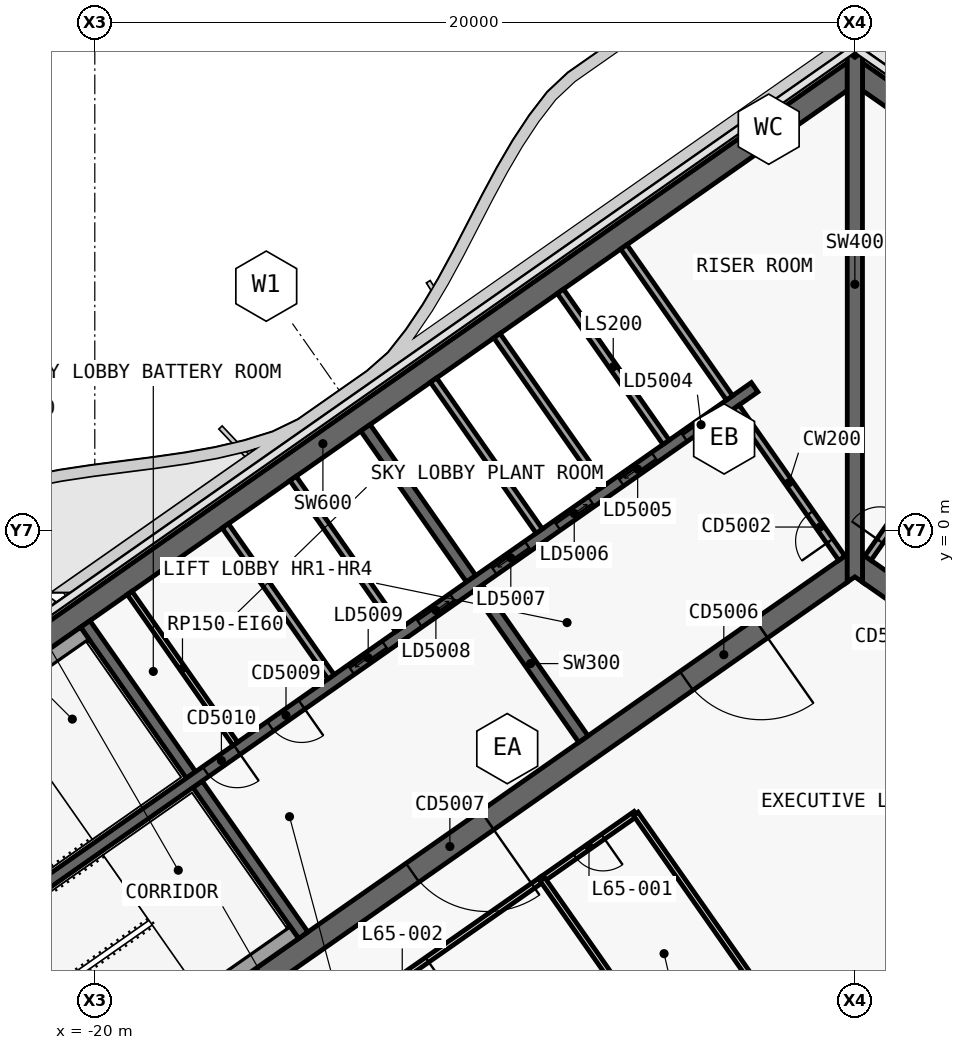
"""IFC4 building model, lengths in metres.
Left out: names, types, materials, properties, quantities, classifications, styles, units other than length and angle.
Written with IfcOpenShell. Run it as: python <this file> out.ifc"""

import sys

from ifc_helpers import new_model, si_unit, direction, frame, frame_2d, origin, place, context, subcontext, project, spatial, polyline, rectangle, outline, extrude, element, fill, save


model = new_model("IFC4")
c1 = context("Model", 3, precision=1e-05, world=origin(), true_north=direction((0.0, 1.0)))
c2 = subcontext(c1, "Body", "Model", "MODEL_VIEW")
j1 = project(units=[si_unit("LENGTHUNIT", "METRE"), si_unit("PLANEANGLEUNIT", "RADIAN")], contexts=[c1])
p1 = place(None, origin())
s1 = spatial("IfcSite", under=j1, at=p1, CompositionType="ELEMENT")
p2 = place(p1, origin())
s2 = spatial("IfcBuilding", under=s1, at=p2, CompositionType="ELEMENT")
p3 = place(p2, frame((0.0, 0.0, 276.1)))
s3 = spatial("IfcBuildingStorey", under=s2, at=p3, CompositionType="ELEMENT", Elevation=276.1)
p4 = place(p3, frame((-0.028, 12.066, 0.0), z_axis=(0.0, 0.0, 1.0), x_axis=(-0.819151382952, -0.573577380837, 0.0)))
e1 = element("IfcWall", 1, at=p4, inside=s3, PredefinedType="SHEAR", context=c2, shape_type="SweptSolid", body=[
    extrude(outline(polyline([(33.898, 0.3), (0.42, 0.3), (0.0, -0.3), (33.898, -0.3), (33.898, 0.3)])), origin(), (0.0, 0.0, 1.0), 3.9),
])
p5 = place(p3, frame((-0.028, -0.874, 0.0), z_axis=(0.0, 0.0, 1.0), x_axis=(-0.819150035022, -0.573579305871, 0.0)))
e2 = element("IfcWall", 2, at=p5, inside=s3, PredefinedType="SHEAR", context=c2, shape_type="SweptSolid", body=[
    extrude(outline(polyline([(26.476, 0.3), (0.42, 0.3), (0.0, -0.3), (26.476, -0.3), (26.476, 0.3)])), origin(), (0.0, 0.0, 1.0), 3.9),
])
p6 = place(p5, frame((2.976, 0.0, 0.0)))
e3 = element("IfcOpeningElement", 3, at=p6, cuts=e2, PredefinedType="OPENING", context=c2, shape_type="SweptSolid", body=[
    extrude(rectangle(XDim=2.4, YDim=2.1, at=frame_2d((1.2, 1.05))), frame((0.0, 0.31, 0.0), z_axis=(0.0, -1.0, 0.0), x_axis=(1.0, 0.0, 0.0)), (0.0, 0.0, 1.0), 0.62),
])
p7 = place(p5, frame((11.776, 0.0, 0.0)))
e4 = element("IfcOpeningElement", 4, at=p7, cuts=e2, PredefinedType="OPENING", context=c2, shape_type="SweptSolid", body=[
    extrude(rectangle(XDim=2.4, YDim=2.1, at=frame_2d((1.2, 1.05))), frame((0.0, 0.31, 0.0), z_axis=(0.0, -1.0, 0.0), x_axis=(1.0, 0.0, 0.0)), (0.0, 0.0, 1.0), 0.62),
])
p8 = place(p3, frame((-7.143, -5.49, 0.0), z_axis=(0.0, 0.0, 1.0), x_axis=(-0.573617744349, 0.819123118565, 0.0)))
e5 = element("IfcWall", 5, at=p8, inside=s3, PredefinedType="SHEAR", context=c2, shape_type="SweptSolid", body=[
    extrude(outline(polyline([(4.85, 0.15), (0.0, 0.15), (0.0, -0.15), (4.85, -0.15), (4.85, 0.15)])), origin(), (0.0, 0.0, 1.0), 3.9),
])
p9 = place(p3, frame((-10.097, -1.271, 0.0), z_axis=(0.0, 0.0, 1.0), x_axis=(-0.573560315113, 0.819163332265, 0.0)))
e6 = element("IfcWall", 6, at=p9, inside=s3, PredefinedType="SHEAR", context=c2, shape_type="SweptSolid", body=[
    extrude(outline(polyline([(4.85, -0.15), (4.85, 0.15), (0.0, 0.15), (0.0, -0.15), (4.85, -0.15)])), origin(), (0.0, 0.0, 1.0), 3.9),
])
p10 = place(p3, frame((-14.515, -10.652, 0.0), z_axis=(0.0, 0.0, 1.0), x_axis=(-0.573560315113, 0.819163332265, 0.0)))
e7 = element("IfcWall", 7, at=p10, inside=s3, PredefinedType="SHEAR", context=c2, shape_type="SweptSolid", body=[
    extrude(outline(polyline([(4.85, 0.15), (0.0, 0.15), (0.0, -0.15), (4.85, -0.15), (4.85, 0.15)])), origin(), (0.0, 0.0, 1.0), 3.9),
])
p11 = place(p3, frame((-17.469, -6.433, 0.0), z_axis=(0.0, 0.0, 1.0), x_axis=(-0.573594092424, 0.81913968109, 0.0)))
e8 = element("IfcWall", 8, at=p11, inside=s3, PredefinedType="SHEAR", context=c2, shape_type="SweptSolid", body=[
    extrude(outline(polyline([(4.85, -0.15), (4.85, 0.15), (0.0, 0.15), (0.0, -0.15), (4.85, -0.15)])), origin(), (0.0, 0.0, 1.0), 3.9),
])
p12 = place(p3, frame((-2.638, 3.768, 0.0), z_axis=(0.0, 0.0, 1.0), x_axis=(-0.819155014212, -0.573572194837, 0.0)))
e9 = element("IfcWall", 9, at=p12, inside=s3, PredefinedType="SHEAR", context=c2, shape_type="SweptSolid", body=[
    extrude(outline(polyline([(26.4, 0.15), (0.0, 0.15), (0.0, -0.15), (26.4, -0.15), (26.4, 0.15)])), origin(), (0.0, 0.0, 1.0), 3.9),
])
p13 = place(p12, frame((1.169, 0.0, 0.0)))
e10 = element("IfcOpeningElement", 10, at=p13, cuts=e9, PredefinedType="OPENING", context=c2, shape_type="SweptSolid", body=[
    extrude(rectangle(XDim=1.1, YDim=2.1, at=frame_2d((0.55, 1.05))), frame((0.0, 0.16, 0.0), z_axis=(0.0, -1.0, 0.0), x_axis=(1.0, 0.0, 0.0)), (0.0, 0.0, 1.0), 0.32),
])
p14 = place(p12, frame((3.206, 0.0, 0.0)))
e11 = element("IfcOpeningElement", 11, at=p14, cuts=e9, PredefinedType="OPENING", context=c2, shape_type="SweptSolid", body=[
    extrude(rectangle(XDim=1.1, YDim=2.1, at=frame_2d((0.55, 1.05))), frame((0.0, 0.16, 0.0), z_axis=(0.0, -1.0, 0.0), x_axis=(1.0, 0.0, 0.0)), (0.0, 0.0, 1.0), 0.32),
])
p15 = place(p12, frame((5.244, 0.0, 0.0)))
e12 = element("IfcOpeningElement", 12, at=p15, cuts=e9, PredefinedType="OPENING", context=c2, shape_type="SweptSolid", body=[
    extrude(rectangle(XDim=1.1, YDim=2.1, at=frame_2d((0.55, 1.05))), frame((0.0, 0.16, 0.0), z_axis=(0.0, -1.0, 0.0), x_axis=(1.0, 0.0, 0.0)), (0.0, 0.0, 1.0), 0.32),
])
p16 = place(p12, frame((7.281, 0.0, 0.0)))
e13 = element("IfcOpeningElement", 13, at=p16, cuts=e9, PredefinedType="OPENING", context=c2, shape_type="SweptSolid", body=[
    extrude(rectangle(XDim=1.1, YDim=2.1, at=frame_2d((0.55, 1.05))), frame((0.0, 0.16, 0.0), z_axis=(0.0, -1.0, 0.0), x_axis=(1.0, 0.0, 0.0)), (0.0, 0.0, 1.0), 0.32),
])
p17 = place(p12, frame((9.688, 0.0, 0.0)))
e14 = element("IfcOpeningElement", 14, at=p17, cuts=e9, PredefinedType="OPENING", context=c2, shape_type="SweptSolid", body=[
    extrude(rectangle(XDim=1.1, YDim=2.1, at=frame_2d((0.55, 1.05))), frame((0.0, 0.16, 0.0), z_axis=(0.0, -1.0, 0.0), x_axis=(1.0, 0.0, 0.0)), (0.0, 0.0, 1.0), 0.32),
])
p18 = place(p12, frame((11.863, 0.0, 0.0)))
e15 = element("IfcOpeningElement", 15, at=p18, cuts=e9, PredefinedType="OPENING", context=c2, shape_type="SweptSolid", body=[
    extrude(rectangle(XDim=1.1, YDim=2.1, at=frame_2d((0.55, 1.05))), frame((0.0, 0.16, 0.0), z_axis=(0.0, -1.0, 0.0), x_axis=(1.0, 0.0, 0.0)), (0.0, 0.0, 1.0), 0.32),
])
p19 = place(p12, frame((14.552, 0.0, 0.0)))
e16 = element("IfcOpeningElement", 16, at=p19, cuts=e9, PredefinedType="OPENING", context=c2, shape_type="SweptSolid", body=[
    extrude(rectangle(XDim=1.0, YDim=2.1, at=frame_2d((0.5, 1.05))), frame((0.0, 0.16, 0.0), z_axis=(0.0, -1.0, 0.0), x_axis=(1.0, 0.0, 0.0)), (0.0, 0.0, 1.0), 0.32),
])
p20 = place(p12, frame((16.627, 0.0, 0.0)))
e17 = element("IfcOpeningElement", 17, at=p20, cuts=e9, PredefinedType="OPENING", context=c2, shape_type="SweptSolid", body=[
    extrude(rectangle(XDim=1.0, YDim=2.1, at=frame_2d((0.5, 1.05))), frame((0.0, 0.16, 0.0), z_axis=(0.0, -1.0, 0.0), x_axis=(1.0, 0.0, 0.0)), (0.0, 0.0, 1.0), 0.32),
])
p21 = place(p3, frame((0.028, 12.066, 0.0), z_axis=(0.0, 0.0, 1.0), x_axis=(0.819151382952, -0.573577380837, 0.0)))
e18 = element("IfcWall", 18, at=p21, inside=s3, PredefinedType="SHEAR", context=c2, shape_type="SweptSolid", body=[
    extrude(outline(polyline([(33.898, 0.3), (0.0, 0.3), (0.42, -0.3), (33.898, -0.3), (33.898, 0.3)])), origin(), (0.0, 0.0, 1.0), 3.9),
])
p22 = place(p3, frame((0.028, -0.874, 0.0), z_axis=(0.0, 0.0, 1.0), x_axis=(0.819150035022, -0.573579305871, 0.0)))
e19 = element("IfcWall", 19, at=p22, inside=s3, PredefinedType="SHEAR", context=c2, shape_type="SweptSolid", body=[
    extrude(outline(polyline([(26.476, 0.3), (0.0, 0.3), (0.42, -0.3), (26.476, -0.3), (26.476, 0.3)])), origin(), (0.0, 0.0, 1.0), 3.9),
])
p23 = place(p22, frame((6.576, 0.0, 0.0)))
e20 = element("IfcOpeningElement", 20, at=p23, cuts=e19, PredefinedType="OPENING", context=c2, shape_type="SweptSolid", body=[
    extrude(rectangle(XDim=1.5, YDim=2.1, at=frame_2d((0.75, 1.05))), frame((0.0, 0.31, 0.0), z_axis=(0.0, -1.0, 0.0), x_axis=(1.0, 0.0, 0.0)), (0.0, 0.0, 1.0), 0.62),
])
p24 = place(p22, frame((12.226, 0.0, 0.0)))
e21 = element("IfcOpeningElement", 21, at=p24, cuts=e19, PredefinedType="OPENING", context=c2, shape_type="SweptSolid", body=[
    extrude(rectangle(XDim=1.5, YDim=2.1, at=frame_2d((0.75, 1.05))), frame((0.0, 0.31, 0.0), z_axis=(0.0, -1.0, 0.0), x_axis=(1.0, 0.0, 0.0)), (0.0, 0.0, 1.0), 0.62),
])
p25 = place(p3, frame((0.0, -1.361, 0.0), z_axis=(0.0, 0.0, 1.0), x_axis=(0.0, 1.0, 0.0)))
e22 = element("IfcWall", 22, at=p25, inside=s3, PredefinedType="SHEAR", context=c2, shape_type="SweptSolid", body=[
    extrude(outline(polyline([(0.14, 0.2), (0.0, 0.2), (0.14, 0.0), (0.0, -0.2), (0.14, -0.2), (1.012, -0.2), (12.94, -0.2), (13.813, -0.2), (13.893, -0.2), (13.933, -0.172), (13.813, 0.0), (13.933, 0.172), (13.893, 0.2), (13.813, 0.2), (12.94, 0.2), (1.012, 0.2), (0.14, 0.2)])), origin(), (0.0, 0.0, 1.0), 3.9),
])
p26 = place(p3, frame((-4.967, 2.321, 0.0), z_axis=(0.0, 0.0, 1.0), x_axis=(-0.573594092424, 0.81913968109, 0.0)))
e23 = element("IfcWall", 23, at=p26, inside=s3, PredefinedType="SOLIDWALL", context=c2, shape_type="SweptSolid", body=[
    extrude(rectangle(XDim=4.85, YDim=0.2, at=frame_2d((2.425, 0.0))), origin(), (0.0, 0.0, 1.0), 3.9),
])
p27 = place(p3, frame((-6.636, 1.152, 0.0), z_axis=(0.0, 0.0, 1.0), x_axis=(-0.573560315113, 0.819163332265, 0.0)))
e24 = element("IfcWall", 24, at=p27, inside=s3, PredefinedType="SOLIDWALL", context=c2, shape_type="SweptSolid", body=[
    extrude(rectangle(XDim=4.85, YDim=0.2, at=frame_2d((2.425, 0.0))), origin(), (0.0, 0.0, 1.0), 3.9),
])
p28 = place(p3, frame((-8.305, -0.017, 0.0), z_axis=(0.0, 0.0, 1.0), x_axis=(-0.573594092424, 0.81913968109, 0.0)))
e25 = element("IfcWall", 25, at=p28, inside=s3, PredefinedType="SOLIDWALL", context=c2, shape_type="SweptSolid", body=[
    extrude(rectangle(XDim=4.85, YDim=0.2, at=frame_2d((2.425, 0.0))), origin(), (0.0, 0.0, 1.0), 3.9),
])
p29 = place(p3, frame((-16.302, -5.616, 0.0), z_axis=(0.0, 0.0, 1.0), x_axis=(-0.573560315113, 0.819163332265, 0.0)))
e26 = element("IfcWall", 26, at=p29, inside=s3, PredefinedType="PARTITIONING", context=c2, shape_type="SweptSolid", body=[
    extrude(rectangle(XDim=4.85, YDim=0.15, at=frame_2d((2.425, 0.0))), origin(), (0.0, 0.0, 1.0), 3.62),
])
p30 = place(p3, frame((-12.001, -2.605, 0.0), z_axis=(0.0, 0.0, 1.0), x_axis=(-0.573560315113, 0.819163332265, 0.0)))
e27 = element("IfcWall", 27, at=p30, inside=s3, PredefinedType="SOLIDWALL", context=c2, shape_type="SweptSolid", body=[
    extrude(rectangle(XDim=4.85, YDim=0.2, at=frame_2d((2.425, 0.0))), origin(), (0.0, 0.0, 1.0), 3.9),
])
p31 = place(p3, frame((-13.783, -3.852, 0.0), z_axis=(0.0, 0.0, 1.0), x_axis=(-0.573594092424, 0.81913968109, 0.0)))
e28 = element("IfcWall", 28, at=p31, inside=s3, PredefinedType="SOLIDWALL", context=c2, shape_type="SweptSolid", body=[
    extrude(rectangle(XDim=4.85, YDim=0.2, at=frame_2d((2.425, 0.0))), origin(), (0.0, 0.0, 1.0), 3.9),
])
p32 = place(p3, frame((-20.259, -2.71, 0.0), z_axis=(0.0, 0.0, 1.0), x_axis=(-0.81914849389, -0.573581506813, 0.0)))
e29 = element("IfcWall", 29, at=p32, inside=s3, PredefinedType="SOLIDWALL", context=c2, shape_type="SweptSolid", body=[
    extrude(rectangle(XDim=8.25, YDim=0.4, at=frame_2d((4.125, 0.0))), origin(), (0.0, 0.0, 1.0), 3.62),
])
p33 = place(p3, frame((-14.753, -10.574, 0.0), z_axis=(0.0, 0.0, 1.0), x_axis=(-0.819158229677, -0.573567602601, 0.0)))
e30 = element("IfcWall", 30, at=p33, inside=s3, PredefinedType="SOLIDWALL", context=c2, shape_type="SweptSolid", body=[
    extrude(rectangle(XDim=8.25, YDim=0.4, at=frame_2d((4.125, 0.0))), origin(), (0.0, 0.0, 1.0), 3.62),
])
p34 = place(p3, frame((-0.344, -0.729, 0.0), z_axis=(0.0, 0.0, 1.0), x_axis=(-0.573560315113, 0.819163332265, 0.0)))
e31 = element("IfcWall", 31, at=p34, inside=s3, PredefinedType="SOLIDWALL", context=c2, shape_type="SweptSolid", body=[
    extrude(rectangle(XDim=4.85, YDim=0.2, at=frame_2d((2.425, 0.0))), origin(), (0.0, 0.0, 1.0), 3.62),
])
p35 = place(p34, frame((0.55, 0.0, 0.0)))
e32 = element("IfcOpeningElement", 32, at=p35, cuts=e31, PredefinedType="OPENING", context=c2, shape_type="SweptSolid", body=[
    extrude(rectangle(XDim=0.9, YDim=2.1, at=frame_2d((0.45, 1.05))), frame((0.0, 0.11, 0.0), z_axis=(0.0, -1.0, 0.0), x_axis=(1.0, 0.0, 0.0)), (0.0, 0.0, 1.0), 0.22),
])
p36 = place(p3, frame((-3.298, 3.49, 0.0), z_axis=(0.0, 0.0, 1.0), x_axis=(-0.573560315113, 0.819163332265, 0.0)))
e33 = element("IfcWall", 33, at=p36, inside=s3, PredefinedType="SOLIDWALL", context=c2, shape_type="SweptSolid", body=[
    extrude(rectangle(XDim=4.85, YDim=0.2, at=frame_2d((2.425, 0.0))), origin(), (0.0, 0.0, 1.0), 3.62),
])
p37 = place(p3, frame((0.344, -0.729, 0.0), z_axis=(0.0, 0.0, 1.0), x_axis=(0.573560315113, 0.819163332265, 0.0)))
e34 = element("IfcWall", 34, at=p37, inside=s3, PredefinedType="SOLIDWALL", context=c2, shape_type="SweptSolid", body=[
    extrude(rectangle(XDim=4.85, YDim=0.2, at=frame_2d((2.425, 0.0))), origin(), (0.0, 0.0, 1.0), 3.62),
])
p38 = place(p37, frame((0.55, 0.0, 0.0)))
e35 = element("IfcOpeningElement", 35, at=p38, cuts=e34, PredefinedType="OPENING", context=c2, shape_type="SweptSolid", body=[
    extrude(rectangle(XDim=0.9, YDim=2.1, at=frame_2d((0.45, 1.05))), frame((0.0, 0.11, 0.0), z_axis=(0.0, -1.0, 0.0), x_axis=(1.0, 0.0, 0.0)), (0.0, 0.0, 1.0), 0.22),
])
p39 = place(p3, frame((-5.766, -7.456, 0.0), z_axis=(0.0, 0.0, 1.0), x_axis=(-0.819132568355, -0.573604249862, 0.0)))
e36 = element("IfcWall", 36, at=p39, inside=s3, PredefinedType="PARTITIONING", context=c2, shape_type="SweptSolid", body=[
    extrude(rectangle(XDim=3.002, YDim=0.15, at=frame_2d((1.501, 0.0))), origin(), (0.0, 0.0, 1.0), 3.05),
])
p40 = place(p39, frame((1.051, 0.0, 0.0)))
e37 = element("IfcOpeningElement", 37, at=p40, cuts=e36, PredefinedType="OPENING", context=c2, shape_type="SweptSolid", body=[
    extrude(rectangle(XDim=0.9, YDim=2.1, at=frame_2d((0.45, 1.05))), frame((0.0, 0.085, 0.0), z_axis=(0.0, -1.0, 0.0), x_axis=(1.0, 0.0, 0.0)), (0.0, 0.0, 1.0), 0.17),
])
p41 = place(p3, frame((-8.222, -9.175, 0.0), z_axis=(0.0, 0.0, 1.0), x_axis=(-0.819151661297, -0.57357698332, 0.0)))
e38 = element("IfcWall", 38, at=p41, inside=s3, PredefinedType="PARTITIONING", context=c2, shape_type="SweptSolid", body=[
    extrude(rectangle(XDim=9.004, YDim=0.15, at=frame_2d((4.502, 0.0))), origin(), (0.0, 0.0, 1.0), 3.05),
])
p42 = place(p41, frame((3.702, 0.0, 0.0)))
e39 = element("IfcOpeningElement", 39, at=p42, cuts=e38, PredefinedType="OPENING", context=c2, shape_type="SweptSolid", body=[
    extrude(rectangle(XDim=1.6, YDim=2.1, at=frame_2d((0.8, 1.05))), frame((0.0, 0.085, 0.0), z_axis=(0.0, -1.0, 0.0), x_axis=(1.0, 0.0, 0.0)), (0.0, 0.0, 1.0), 0.17),
])
p43 = place(p3, frame((-1.849, -13.051, 0.0), z_axis=(0.0, 0.0, 1.0), x_axis=(-0.57357985571, 0.819149650018, 0.0)))
e40 = element("IfcWall", 40, at=p43, inside=s3, PredefinedType="PARTITIONING", context=c2, shape_type="SweptSolid", body=[
    extrude(rectangle(XDim=6.832, YDim=0.15, at=frame_2d((3.416, 0.0))), origin(), (0.0, 0.0, 1.0), 3.05),
])
p44 = place(p3, frame((-3.922, -15.32, 0.0), z_axis=(0.0, 0.0, 1.0), x_axis=(-0.573560650686, 0.819163097304, 0.0)))
e41 = element("IfcWall", 41, at=p44, inside=s3, PredefinedType="PARTITIONING", context=c2, shape_type="SweptSolid", body=[
    extrude(rectangle(XDim=7.5, YDim=0.15, at=frame_2d((3.75, 0.0))), origin(), (0.0, 0.0, 1.0), 3.0),
])
p45 = place(p13, origin())
e42 = element("IfcDoor", 42, at=p45, inside=s3, OperationType="SLIDING_TO_LEFT", PredefinedType="DOOR", context=c2, shape_type="SweptSolid", body=[
    extrude(rectangle(XDim=1.1, YDim=2.1, at=frame_2d((0.55, 1.05))), frame((0.0, 0.025, 0.0), z_axis=(0.0, -1.0, 0.0), x_axis=(1.0, 0.0, 0.0)), (0.0, 0.0, 1.0), 0.05),
])
fill(e10, e42)
p46 = place(p14, origin())
e43 = element("IfcDoor", 43, at=p46, inside=s3, OperationType="SLIDING_TO_RIGHT", PredefinedType="DOOR", context=c2, shape_type="SweptSolid", body=[
    extrude(rectangle(XDim=1.1, YDim=2.1, at=frame_2d((0.55, 1.05))), frame((0.0, 0.025, 0.0), z_axis=(0.0, -1.0, 0.0), x_axis=(1.0, 0.0, 0.0)), (0.0, 0.0, 1.0), 0.05),
])
fill(e11, e43)
p47 = place(p15, origin())
e44 = element("IfcDoor", 44, at=p47, inside=s3, OperationType="SLIDING_TO_LEFT", PredefinedType="DOOR", context=c2, shape_type="SweptSolid", body=[
    extrude(rectangle(XDim=1.1, YDim=2.1, at=frame_2d((0.55, 1.05))), frame((0.0, 0.025, 0.0), z_axis=(0.0, -1.0, 0.0), x_axis=(1.0, 0.0, 0.0)), (0.0, 0.0, 1.0), 0.05),
])
fill(e12, e44)
p48 = place(p16, origin())
e45 = element("IfcDoor", 45, at=p48, inside=s3, OperationType="SLIDING_TO_RIGHT", PredefinedType="DOOR", context=c2, shape_type="SweptSolid", body=[
    extrude(rectangle(XDim=1.1, YDim=2.1, at=frame_2d((0.55, 1.05))), frame((0.0, 0.025, 0.0), z_axis=(0.0, -1.0, 0.0), x_axis=(1.0, 0.0, 0.0)), (0.0, 0.0, 1.0), 0.05),
])
fill(e13, e45)
p49 = place(p17, origin())
e46 = element("IfcDoor", 46, at=p49, inside=s3, OperationType="SLIDING_TO_LEFT", PredefinedType="DOOR", context=c2, shape_type="SweptSolid", body=[
    extrude(rectangle(XDim=1.1, YDim=2.1, at=frame_2d((0.55, 1.05))), frame((0.0, 0.025, 0.0), z_axis=(0.0, -1.0, 0.0), x_axis=(1.0, 0.0, 0.0)), (0.0, 0.0, 1.0), 0.05),
])
fill(e14, e46)
p50 = place(p18, origin())
e47 = element("IfcDoor", 47, at=p50, inside=s3, OperationType="SLIDING_TO_RIGHT", PredefinedType="DOOR", context=c2, shape_type="SweptSolid", body=[
    extrude(rectangle(XDim=1.1, YDim=2.1, at=frame_2d((0.55, 1.05))), frame((0.0, 0.025, 0.0), z_axis=(0.0, -1.0, 0.0), x_axis=(1.0, 0.0, 0.0)), (0.0, 0.0, 1.0), 0.05),
])
fill(e15, e47)
p51 = place(p19, origin())
e48 = element("IfcDoor", 48, at=p51, inside=s3, OperationType="SINGLE_SWING_RIGHT", PredefinedType="DOOR", context=c2, shape_type="SweptSolid", body=[
    extrude(rectangle(XDim=1.0, YDim=2.1, at=frame_2d((0.5, 1.05))), frame((0.0, 0.025, 0.0), z_axis=(0.0, -1.0, 0.0), x_axis=(1.0, 0.0, 0.0)), (0.0, 0.0, 1.0), 0.05),
])
fill(e16, e48)
p52 = place(p20, origin())
e49 = element("IfcDoor", 49, at=p52, inside=s3, OperationType="SINGLE_SWING_RIGHT", PredefinedType="DOOR", context=c2, shape_type="SweptSolid", body=[
    extrude(rectangle(XDim=1.0, YDim=2.1, at=frame_2d((0.5, 1.05))), frame((0.0, 0.025, 0.0), z_axis=(0.0, -1.0, 0.0), x_axis=(1.0, 0.0, 0.0)), (0.0, 0.0, 1.0), 0.05),
])
fill(e17, e49)
p53 = place(p6, origin())
e50 = element("IfcDoor", 50, at=p53, inside=s3, OperationType="DOUBLE_DOOR_SINGLE_SWING", PredefinedType="DOOR", context=c2, shape_type="SweptSolid", body=[
    extrude(rectangle(XDim=2.4, YDim=2.1, at=frame_2d((1.2, 1.05))), frame((0.0, 0.025, 0.0), z_axis=(0.0, -1.0, 0.0), x_axis=(1.0, 0.0, 0.0)), (0.0, 0.0, 1.0), 0.05),
])
fill(e3, e50)
p54 = place(p7, origin())
e51 = element("IfcDoor", 51, at=p54, inside=s3, OperationType="DOUBLE_DOOR_SINGLE_SWING", PredefinedType="DOOR", context=c2, shape_type="SweptSolid", body=[
    extrude(rectangle(XDim=2.4, YDim=2.1, at=frame_2d((1.2, 1.05))), frame((0.0, 0.025, 0.0), z_axis=(0.0, -1.0, 0.0), x_axis=(1.0, 0.0, 0.0)), (0.0, 0.0, 1.0), 0.05),
])
fill(e4, e51)
p55 = place(p35, origin())
e52 = element("IfcDoor", 52, at=p55, inside=s3, OperationType="SINGLE_SWING_RIGHT", PredefinedType="DOOR", context=c2, shape_type="SweptSolid", body=[
    extrude(rectangle(XDim=0.9, YDim=2.1, at=frame_2d((0.45, 1.05))), frame((0.0, 0.025, 0.0), z_axis=(0.0, -1.0, 0.0), x_axis=(1.0, 0.0, 0.0)), (0.0, 0.0, 1.0), 0.05),
])
fill(e32, e52)
p56 = place(p38, origin())
e53 = element("IfcDoor", 53, at=p56, inside=s3, OperationType="SINGLE_SWING_RIGHT", PredefinedType="DOOR", context=c2, shape_type="SweptSolid", body=[
    extrude(rectangle(XDim=0.9, YDim=2.1, at=frame_2d((0.45, 1.05))), frame((0.0, 0.025, 0.0), z_axis=(0.0, -1.0, 0.0), x_axis=(1.0, 0.0, 0.0)), (0.0, 0.0, 1.0), 0.05),
])
fill(e35, e53)
p57 = place(p40, origin())
e54 = element("IfcDoor", 54, at=p57, inside=s3, OperationType="SINGLE_SWING_RIGHT", PredefinedType="DOOR", context=c2, shape_type="SweptSolid", body=[
    extrude(rectangle(XDim=0.9, YDim=2.1, at=frame_2d((0.45, 1.05))), frame((0.0, 0.025, 0.0), z_axis=(0.0, -1.0, 0.0), x_axis=(1.0, 0.0, 0.0)), (0.0, 0.0, 1.0), 0.05),
])
fill(e37, e54)
p58 = place(p42, origin())
e55 = element("IfcDoor", 55, at=p58, inside=s3, OperationType="DOUBLE_DOOR_SINGLE_SWING", PredefinedType="DOOR", context=c2, shape_type="SweptSolid", body=[
    extrude(rectangle(XDim=1.6, YDim=2.1, at=frame_2d((0.8, 1.05))), frame((0.0, 0.025, 0.0), z_axis=(0.0, -1.0, 0.0), x_axis=(1.0, 0.0, 0.0)), (0.0, 0.0, 1.0), 0.05),
])
fill(e39, e55)
save(model, sys.argv[1])
